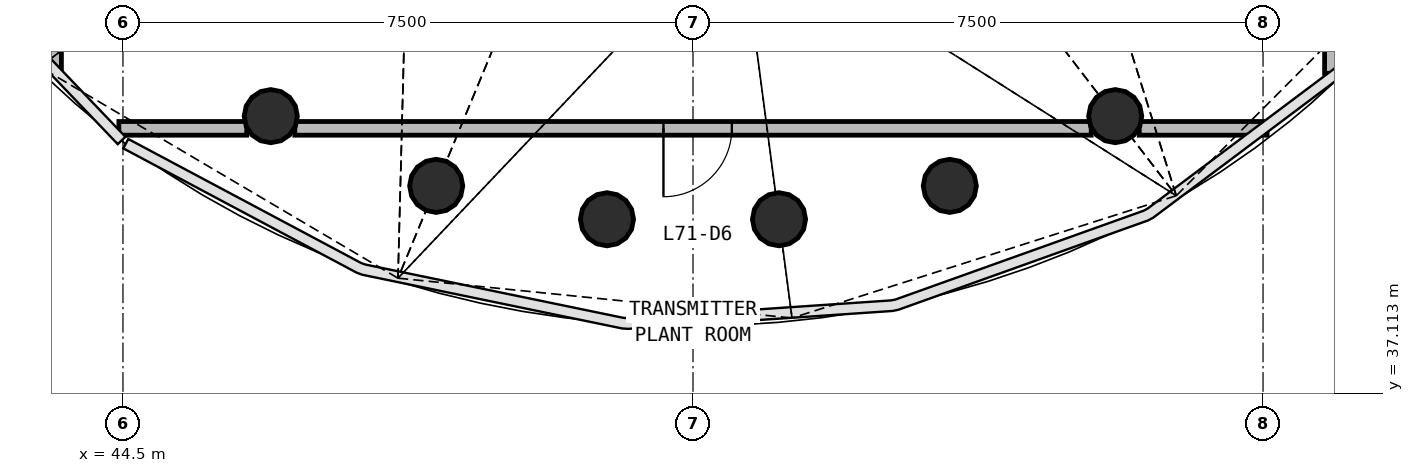
"""IFC4 building model, lengths in metres.
Left out: names, types, materials, properties, quantities, classifications, styles, units other than length and angle.
Written with IfcOpenShell. Run it as: python <this file> out.ifc"""

import sys

from ifc_helpers import new_model, si_unit, direction, frame, frame_2d, origin, origin_2d, place, context, subcontext, project, spatial, rectangle, circle, extrude, source, transform, mapped, element, fill, save


model = new_model("IFC4")
c1 = context("Model", 3, precision=1e-05, world=origin(), true_north=direction((0.0, 1.0)))
c2 = subcontext(c1, "Body", "Model", "MODEL_VIEW")
j1 = project(units=[si_unit("LENGTHUNIT", "METRE"), si_unit("PLANEANGLEUNIT", "RADIAN")], contexts=[c1])
p1 = place(None, origin())
s1 = spatial("IfcSite", under=j1, at=p1, CompositionType="ELEMENT")
p2 = place(p1, origin())
s2 = spatial("IfcBuilding", under=s1, at=p2, CompositionType="ELEMENT")
p3 = place(p2, frame((0.0, 0.0, 287.1)))
s3 = spatial("IfcBuildingStorey", under=s2, at=p3, CompositionType="ELEMENT", Elevation=287.1)
m1 = source(origin(), c2, "Body", "SweptSolid", [
    extrude(circle(Radius=0.35, at=origin_2d()), origin(), (0.0, 0.0, 1.0), 3.573),
])
p4 = place(p3, frame((46.445, 40.76, 0.159), z_axis=(0.270857062246, 0.352920465817, 0.89559119951), x_axis=(-0.793297249859, 0.608834520511, 0.0)))
e1 = element("IfcColumn", 1, at=p4, inside=s3, PredefinedType="COLUMN", context=c2, shape_type="MappedRepresentation", body=[
    mapped(m1, transform((0.0, 0.0, 0.0), scale=1.0)),
])
m2 = source(origin(), c2, "Body", "SweptSolid", [
    extrude(circle(Radius=0.35, at=origin_2d()), origin(), (0.0, 0.0, 1.0), 3.505),
])
p5 = place(p3, frame((48.621, 39.843, 0.146), z_axis=(0.156165944661, 0.376971495318, 0.912964779959), x_axis=(-0.923862861885, 0.382723676339, 0.0)))
e2 = element("IfcColumn", 2, at=p5, inside=s3, PredefinedType="COLUMN", context=c2, shape_type="MappedRepresentation", body=[
    mapped(m2, transform((0.0, 0.0, 0.0), scale=1.0)),
])
m3 = source(origin(), c2, "Body", "SweptSolid", [
    extrude(circle(Radius=0.35, at=origin_2d()), origin(), (0.0, 0.0, 1.0), 3.46),
])
p6 = place(p3, frame((50.868, 39.404, 0.136), z_axis=(0.049603484084, 0.377141710425, 0.924826267266), x_axis=(-0.991461239084, 0.130401730791, 0.0)))
e3 = element("IfcColumn", 3, at=p6, inside=s3, PredefinedType="COLUMN", context=c2, shape_type="MappedRepresentation", body=[
    mapped(m3, transform((0.0, 0.0, 0.0), scale=1.0)),
])
m4 = source(origin(), c2, "Body", "SweptSolid", [
    extrude(circle(Radius=0.35, at=origin_2d()), origin(), (0.0, 0.0, 1.0), 3.437),
])
p7 = place(p3, frame((53.132, 39.404, 0.131), z_axis=(-0.047591855306, 0.361840165562, 0.931024548492), x_axis=(-0.991460918944, -0.130404164839, 0.0)))
e4 = element("IfcColumn", 4, at=p7, inside=s3, PredefinedType="COLUMN", context=c2, shape_type="MappedRepresentation", body=[
    mapped(m4, transform((0.0, 0.0, 0.0), scale=1.0)),
])
m5 = source(origin(), c2, "Body", "SweptSolid", [
    extrude(circle(Radius=0.35, at=origin_2d()), origin(), (0.0, 0.0, 1.0), 3.426),
])
p8 = place(p3, frame((55.379, 39.843, 0.128), z_axis=(-0.136544060372, 0.329743928676, 0.934143811775), x_axis=(-0.923919496495, -0.382586936521, 0.0)))
e5 = element("IfcColumn", 5, at=p8, inside=s3, PredefinedType="COLUMN", context=c2, shape_type="MappedRepresentation", body=[
    mapped(m5, transform((0.0, 0.0, 0.0), scale=1.0)),
])
m6 = source(origin(), c2, "Body", "SweptSolid", [
    extrude(circle(Radius=0.35, at=origin_2d()), origin(), (0.0, 0.0, 1.0), 3.418),
])
p9 = place(p3, frame((57.555, 40.76, 0.126), z_axis=(-0.214058059643, 0.278911152121, 0.9361558184), x_axis=(-0.793295635134, -0.608836624455, 0.0)))
e6 = element("IfcColumn", 6, at=p9, inside=s3, PredefinedType="COLUMN", context=c2, shape_type="MappedRepresentation", body=[
    mapped(m6, transform((0.0, 0.0, 0.0), scale=1.0)),
])
p10 = place(p3, frame((43.6, 54.677, 0.0), z_axis=(0.0, 0.0, 1.0), x_axis=(0.0, -1.0, 0.0)))
e7 = element("IfcWall", 7, at=p10, inside=s3, PredefinedType="PARTITIONING", context=c2, shape_type="SweptSolid", body=[
    extrude(rectangle(XDim=13.354, YDim=0.18, at=frame_2d((6.677, 0.0))), origin(), (0.0, 0.0, 1.0), 2.62),
])
p11 = place(p3, frame((60.4, 54.677, 0.0), z_axis=(0.0, 0.0, 1.0), x_axis=(0.0, -1.0, 0.0)))
e8 = element("IfcWall", 8, at=p11, inside=s3, PredefinedType="PARTITIONING", context=c2, shape_type="SweptSolid", body=[
    extrude(rectangle(XDim=13.354, YDim=0.18, at=frame_2d((6.677, 0.0))), origin(), (0.0, 0.0, 1.0), 2.62),
])
p12 = place(p11, frame((6.104, 0.0, 0.0)))
e9 = element("IfcOpeningElement", 9, at=p12, cuts=e8, PredefinedType="OPENING", context=c2, shape_type="SweptSolid", body=[
    extrude(rectangle(XDim=1.0, YDim=2.1, at=frame_2d((0.5, 1.05))), frame((0.0, 0.1, 0.0), z_axis=(0.0, -1.0, 0.0), x_axis=(1.0, 0.0, 0.0)), (0.0, 0.0, 1.0), 0.2),
])
p13 = place(p3, frame((57.239, 40.6, 0.0), z_axis=(0.0, 0.0, 1.0), x_axis=(-1.0, 0.0, 0.0)))
e10 = element("IfcWall", 10, at=p13, inside=s3, PredefinedType="PARTITIONING", context=c2, shape_type="SweptSolid", body=[
    extrude(rectangle(XDim=10.478, YDim=0.18, at=frame_2d((5.239, 0.0))), origin(), (0.0, 0.0, 1.0), 2.62),
])
p14 = place(p13, frame((4.728, 0.0, 0.0)))
e11 = element("IfcOpeningElement", 11, at=p14, cuts=e10, PredefinedType="OPENING", context=c2, shape_type="SweptSolid", body=[
    extrude(rectangle(XDim=0.9, YDim=2.1, at=frame_2d((0.45, 1.05))), frame((0.0, 0.1, 0.0), z_axis=(0.0, -1.0, 0.0), x_axis=(1.0, 0.0, 0.0)), (0.0, 0.0, 1.0), 0.2),
])
for number, where, z_axis, x_axis in (
    (12, (44.446, 40.6, 0.0), (0.0, 0.0, 1.0), (1.0, 0.0, 0.0)),
    (13, (57.871, 40.6, 0.0), (0.0, 0.0, 1.0), (1.0, 0.0, 0.0)),
):
    element("IfcWall", number, at=place(p3, frame(where, z_axis=z_axis, x_axis=x_axis)), inside=s3, PredefinedType="PARTITIONING", context=c2, shape_type="SweptSolid", body=[
        extrude(rectangle(XDim=1.682, YDim=0.18, at=frame_2d((0.841, 0.0))), origin(), (0.0, 0.0, 1.0), 2.62),
    ])
m7 = source(origin(), c2, "Body", "SweptSolid", [
    extrude(rectangle(XDim=0.9, YDim=2.1, at=frame_2d((0.45, 1.05))), frame((0.0, 0.025, 0.0), z_axis=(0.0, -1.0, 0.0), x_axis=(1.0, 0.0, 0.0)), (0.0, 0.0, 1.0), 0.05),
])
p15 = place(p14, origin())
e14 = element("IfcDoor", 14, at=p15, inside=s3, OperationType="SINGLE_SWING_RIGHT", PredefinedType="DOOR", context=c2, shape_type="MappedRepresentation", body=[
    mapped(m7, transform((0.0, 0.0, 0.0), scale=1.0)),
])
fill(e11, e14)
save(model, sys.argv[1])
